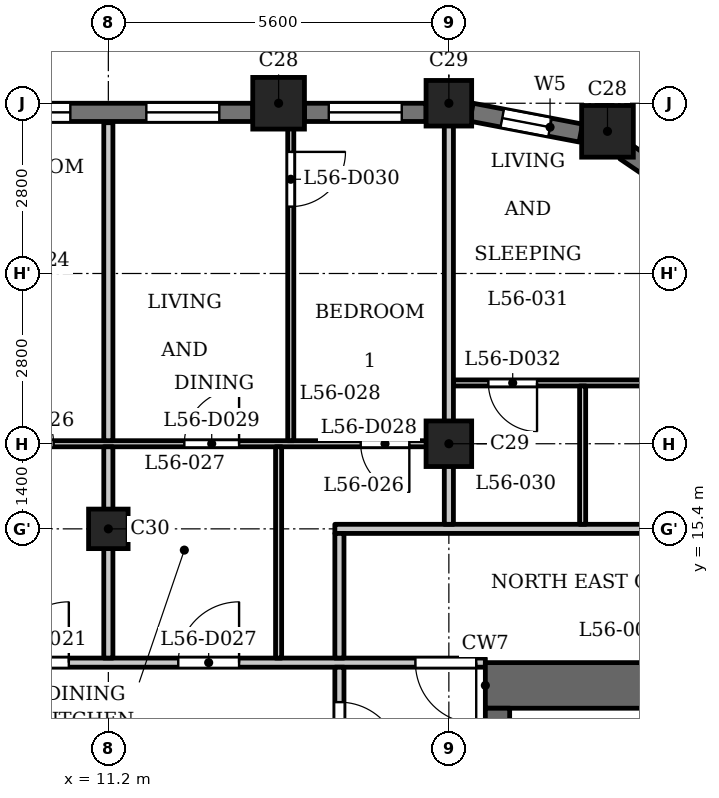
"""IFC4 building model, lengths in metres.
Left out: names, types, materials, properties, quantities, classifications, styles, units other than length and angle.
Written with IfcOpenShell. Run it as: python <this file> out.ifc"""

import sys

from ifc_helpers import new_model, si_unit, direction, frame, frame_2d, origin, origin_2d, place, context, subcontext, project, spatial, rectangle, extrude, element, fill, save


model = new_model("IFC4")
c1 = context("Model", 3, precision=1e-05, world=origin(), true_north=direction((0.0, 1.0)))
c2 = subcontext(c1, "Body", "Model", "MODEL_VIEW")
j1 = project(units=[si_unit("LENGTHUNIT", "METRE"), si_unit("PLANEANGLEUNIT", "RADIAN")], contexts=[c1])
p1 = place(None, origin())
s1 = spatial("IfcSite", under=j1, at=p1, CompositionType="ELEMENT")
p2 = place(p1, origin())
s2 = spatial("IfcBuilding", under=s1, at=p2, CompositionType="ELEMENT")
p3 = place(p2, frame((0.0, 0.0, 216.9)))
s3 = spatial("IfcBuildingStorey", under=s2, at=p3, CompositionType="ELEMENT", Elevation=216.9)
for number, where, z_axis, x_axis in (
    (1, (19.409, 21.938, 0.0), (0.0, 0.0, 1.0), (1.0, 0.0, 0.0)),
    (2, (14.0, 22.4, 0.0), (0.0, 0.0, 1.0), (1.0, 0.0, 0.0)),
):
    element("IfcColumn", number, at=place(p3, frame(where, z_axis=z_axis, x_axis=x_axis)), inside=s3, PredefinedType="COLUMN", context=c2, shape_type="SweptSolid", body=[
        extrude(rectangle(XDim=0.85, YDim=0.85, at=origin_2d()), origin(), (0.0, 0.0, 1.0), 3.5),
    ])
for number, where, z_axis, x_axis in (
    (3, (16.8, 16.8, 0.0), (0.0, 0.0, 1.0), (1.0, 0.0, 0.0)),
    (4, (16.8, 22.4, 0.0), (0.0, 0.0, 1.0), (1.0, 0.0, 0.0)),
):
    element("IfcColumn", number, at=place(p3, frame(where, z_axis=z_axis, x_axis=x_axis)), inside=s3, PredefinedType="COLUMN", context=c2, shape_type="SweptSolid", body=[
        extrude(rectangle(XDim=0.75, YDim=0.75, at=origin_2d()), origin(), (0.0, 0.0, 1.0), 3.5),
    ])
p4 = place(p3, frame((11.2, 15.4, 0.0), z_axis=(0.0, 0.0, 1.0), x_axis=(1.0, 0.0, 0.0)))
e5 = element("IfcColumn", 5, at=p4, inside=s3, PredefinedType="COLUMN", context=c2, shape_type="SweptSolid", body=[
    extrude(rectangle(XDim=0.65, YDim=0.65, at=origin_2d()), origin(), (0.0, 0.0, 1.0), 3.5),
])
p5 = place(p3, frame((20.796, 20.862, 0.0), z_axis=(0.0, 0.0, 1.0), x_axis=(-0.827035970432, 0.562149004813, 0.0)))
e6 = element("IfcWall", 6, at=p5, inside=s3, PredefinedType="SOLIDWALL", context=c2, shape_type="SweptSolid", body=[
    extrude(rectangle(XDim=1.327, YDim=0.3, at=frame_2d((0.664, 0.0))), origin(), (0.0, 0.0, 1.0), 2.5),
])
p6 = place(p3, frame((18.971, 21.91, 0.0), z_axis=(0.0, 0.0, 1.0), x_axis=(-0.982300037503, 0.187314271538, 0.0)))
e7 = element("IfcWall", 7, at=p6, inside=s3, PredefinedType="SOLIDWALL", context=c2, shape_type="SweptSolid", body=[
    extrude(rectangle(XDim=1.831, YDim=0.3, at=frame_2d((0.916, 0.0))), origin(), (0.0, 0.0, 1.0), 2.5),
])
p7 = place(p6, frame((0.516, 0.0, 0.6)))
e8 = element("IfcOpeningElement", 8, at=p7, cuts=e7, PredefinedType="OPENING", context=c2, shape_type="SweptSolid", body=[
    extrude(rectangle(XDim=0.8, YDim=1.55, at=frame_2d((0.4, 0.775))), frame((0.0, 0.16, 0.0), z_axis=(0.0, -1.0, 0.0), x_axis=(1.0, 0.0, 0.0)), (0.0, 0.0, 1.0), 0.32),
])
p8 = place(p3, frame((16.425, 22.25, 0.0), z_axis=(0.0, 0.0, 1.0), x_axis=(-1.0, 0.0, 0.0)))
e9 = element("IfcWall", 9, at=p8, inside=s3, PredefinedType="SOLIDWALL", context=c2, shape_type="SweptSolid", body=[
    extrude(rectangle(XDim=2.0, YDim=0.3, at=frame_2d((1.0, 0.0))), origin(), (0.0, 0.0, 1.0), 2.5),
])
p9 = place(p8, frame((0.4, 0.0, 0.6)))
e10 = element("IfcOpeningElement", 10, at=p9, cuts=e9, PredefinedType="OPENING", context=c2, shape_type="SweptSolid", body=[
    extrude(rectangle(XDim=1.2, YDim=1.55, at=frame_2d((0.6, 0.775))), frame((0.0, 0.16, 0.0), z_axis=(0.0, -1.0, 0.0), x_axis=(1.0, 0.0, 0.0)), (0.0, 0.0, 1.0), 0.32),
])
p10 = place(p3, frame((13.575, 22.25, 0.0), z_axis=(0.0, 0.0, 1.0), x_axis=(-1.0, 0.0, 0.0)))
e11 = element("IfcWall", 11, at=p10, inside=s3, PredefinedType="SOLIDWALL", context=c2, shape_type="SweptSolid", body=[
    extrude(rectangle(XDim=4.75, YDim=0.3, at=frame_2d((2.375, 0.0))), origin(), (0.0, 0.0, 1.0), 2.5),
])
p11 = place(p10, frame((0.55, 0.0, 0.6)))
e12 = element("IfcOpeningElement", 12, at=p11, cuts=e11, PredefinedType="OPENING", context=c2, shape_type="SweptSolid", body=[
    extrude(rectangle(XDim=1.2, YDim=1.55, at=frame_2d((0.6, 0.775))), frame((0.0, 0.16, 0.0), z_axis=(0.0, -1.0, 0.0), x_axis=(1.0, 0.0, 0.0)), (0.0, 0.0, 1.0), 0.32),
])
p12 = place(p10, frame((3.0, 0.0, 0.6)))
e13 = element("IfcOpeningElement", 13, at=p12, cuts=e11, PredefinedType="OPENING", context=c2, shape_type="SweptSolid", body=[
    extrude(rectangle(XDim=1.2, YDim=1.55, at=frame_2d((0.6, 0.775))), frame((0.0, 0.16, 0.0), z_axis=(0.0, -1.0, 0.0), x_axis=(1.0, 0.0, 0.0)), (0.0, 0.0, 1.0), 0.32),
])
p13 = place(p3, frame((17.4, 12.825, 0.0), z_axis=(0.0, 0.0, 1.0), x_axis=(1.0, 0.0, 0.0)))
e14 = element("IfcWall", 14, at=p13, inside=s3, PredefinedType="SHEAR", context=c2, shape_type="SweptSolid", body=[
    extrude(rectangle(XDim=7.6, YDim=0.75, at=frame_2d((3.8, 0.0))), origin(), (0.0, 0.0, 1.0), 3.2),
])
p14 = place(p3, frame((17.6, -12.45, 0.0), z_axis=(0.0, 0.0, 1.0), x_axis=(0.0, 1.0, 0.0)))
e15 = element("IfcWall", 15, at=p14, inside=s3, PredefinedType="SHEAR", context=c2, shape_type="SweptSolid", body=[
    extrude(rectangle(XDim=24.9, YDim=0.4, at=frame_2d((12.45, 0.0))), origin(), (0.0, 0.0, 1.0), 3.2),
])
p15 = place(p14, frame((6.85, 0.0, 0.0)))
e16 = element("IfcOpeningElement", 16, at=p15, cuts=e15, PredefinedType="OPENING", context=c2, shape_type="SweptSolid", body=[
    extrude(rectangle(XDim=0.9, YDim=2.1, at=frame_2d((0.45, 1.05))), frame((0.0, 0.21, 0.0), z_axis=(0.0, -1.0, 0.0), x_axis=(1.0, 0.0, 0.0)), (0.0, 0.0, 1.0), 0.42),
])
p16 = place(p14, frame((10.45, 0.0, 0.0)))
e17 = element("IfcOpeningElement", 17, at=p16, cuts=e15, PredefinedType="OPENING", context=c2, shape_type="SweptSolid", body=[
    extrude(rectangle(XDim=0.9, YDim=2.1, at=frame_2d((0.45, 1.05))), frame((0.0, 0.21, 0.0), z_axis=(0.0, -1.0, 0.0), x_axis=(1.0, 0.0, 0.0)), (0.0, 0.0, 1.0), 0.42),
])
p17 = place(p14, frame((15.6, 0.0, 0.0)))
e18 = element("IfcOpeningElement", 18, at=p17, cuts=e15, PredefinedType="OPENING", context=c2, shape_type="SweptSolid", body=[
    extrude(rectangle(XDim=1.1, YDim=2.1, at=frame_2d((0.55, 1.05))), frame((0.0, 0.21, 0.0), z_axis=(0.0, -1.0, 0.0), x_axis=(1.0, 0.0, 0.0)), (0.0, 0.0, 1.0), 0.42),
])
p18 = place(p14, frame((18.0, 0.0, 0.0)))
e19 = element("IfcOpeningElement", 19, at=p18, cuts=e15, PredefinedType="OPENING", context=c2, shape_type="SweptSolid", body=[
    extrude(rectangle(XDim=1.1, YDim=2.1, at=frame_2d((0.55, 1.05))), frame((0.0, 0.21, 0.0), z_axis=(0.0, -1.0, 0.0), x_axis=(1.0, 0.0, 0.0)), (0.0, 0.0, 1.0), 0.42),
])
p19 = place(p14, frame((23.025, 0.0, 0.0)))
e20 = element("IfcOpeningElement", 20, at=p19, cuts=e15, PredefinedType="OPENING", context=c2, shape_type="SweptSolid", body=[
    extrude(rectangle(XDim=1.1, YDim=2.1, at=frame_2d((0.55, 1.05))), frame((0.0, 0.21, 0.0), z_axis=(0.0, -1.0, 0.0), x_axis=(1.0, 0.0, 0.0)), (0.0, 0.0, 1.0), 0.42),
])
p20 = place(p14, frame((0.775, 0.0, 0.0)))
e21 = element("IfcOpeningElement", 21, at=p20, cuts=e15, PredefinedType="OPENING", context=c2, shape_type="SweptSolid", body=[
    extrude(rectangle(XDim=1.1, YDim=2.1, at=frame_2d((0.55, 1.05))), frame((0.0, 0.21, 0.0), z_axis=(0.0, -1.0, 0.0), x_axis=(1.0, 0.0, 0.0)), (0.0, 0.0, 1.0), 0.42),
])
p21 = place(p14, frame((12.925, 0.0, 0.0)))
e22 = element("IfcOpeningElement", 22, at=p21, cuts=e15, PredefinedType="OPENING", context=c2, shape_type="SweptSolid", body=[
    extrude(rectangle(XDim=1.8, YDim=2.1, at=frame_2d((0.9, 1.05))), frame((0.0, 0.21, 0.0), z_axis=(0.0, -1.0, 0.0), x_axis=(1.0, 0.0, 0.0)), (0.0, 0.0, 1.0), 0.42),
])
p22 = place(p3, frame((-17.4, 13.2, 0.0), z_axis=(0.0, 0.0, 1.0), x_axis=(1.0, 0.0, 0.0)))
e23 = element("IfcWall", 23, at=p22, inside=s3, PredefinedType="PARTITIONING", context=c2, shape_type="SweptSolid", body=[
    extrude(rectangle(XDim=34.8, YDim=0.15, at=frame_2d((17.4, 0.0))), origin(), (0.0, 0.0, 1.0), 3.2),
])
p23 = place(p22, frame((0.25, 0.0, 0.0)))
e24 = element("IfcOpeningElement", 24, at=p23, cuts=e23, PredefinedType="OPENING", context=c2, shape_type="SweptSolid", body=[
    extrude(rectangle(XDim=1.0, YDim=2.1, at=frame_2d((0.5, 1.05))), frame((0.0, 0.085, 0.0), z_axis=(0.0, -1.0, 0.0), x_axis=(1.0, 0.0, 0.0)), (0.0, 0.0, 1.0), 0.17),
])
p24 = place(p22, frame((33.65, 0.0, 0.0)))
e25 = element("IfcOpeningElement", 25, at=p24, cuts=e23, PredefinedType="OPENING", context=c2, shape_type="SweptSolid", body=[
    extrude(rectangle(XDim=1.0, YDim=2.1, at=frame_2d((0.5, 1.05))), frame((0.0, 0.085, 0.0), z_axis=(0.0, -1.0, 0.0), x_axis=(1.0, 0.0, 0.0)), (0.0, 0.0, 1.0), 0.17),
])
p25 = place(p22, frame((15.75, 0.0, 0.0)))
e26 = element("IfcOpeningElement", 26, at=p25, cuts=e23, PredefinedType="OPENING", context=c2, shape_type="SweptSolid", body=[
    extrude(rectangle(XDim=1.0, YDim=2.1, at=frame_2d((0.5, 1.05))), frame((0.0, 0.085, 0.0), z_axis=(0.0, -1.0, 0.0), x_axis=(1.0, 0.0, 0.0)), (0.0, 0.0, 1.0), 0.17),
])
p26 = place(p22, frame((26.95, 0.0, 0.0)))
e27 = element("IfcOpeningElement", 27, at=p26, cuts=e23, PredefinedType="OPENING", context=c2, shape_type="SweptSolid", body=[
    extrude(rectangle(XDim=1.0, YDim=2.1, at=frame_2d((0.5, 1.05))), frame((0.0, 0.085, 0.0), z_axis=(0.0, -1.0, 0.0), x_axis=(1.0, 0.0, 0.0)), (0.0, 0.0, 1.0), 0.17),
])
p27 = place(p22, frame((29.75, 0.0, 0.0)))
e28 = element("IfcOpeningElement", 28, at=p27, cuts=e23, PredefinedType="OPENING", context=c2, shape_type="SweptSolid", body=[
    extrude(rectangle(XDim=1.0, YDim=2.1, at=frame_2d((0.5, 1.05))), frame((0.0, 0.085, 0.0), z_axis=(0.0, -1.0, 0.0), x_axis=(1.0, 0.0, 0.0)), (0.0, 0.0, 1.0), 0.17),
])
p28 = place(p3, frame((14.925, 15.4, 0.0), z_axis=(0.0, 0.0, 1.0), x_axis=(1.0, 0.0, 0.0)))
e29 = element("IfcWall", 29, at=p28, inside=s3, PredefinedType="PARTITIONING", context=c2, shape_type="SweptSolid", body=[
    extrude(rectangle(XDim=9.759, YDim=0.15, at=frame_2d((4.879, 0.0))), origin(), (0.0, 0.0, 1.0), 3.2),
])
p29 = place(p28, frame((7.616, 0.0, 0.0)))
e30 = element("IfcOpeningElement", 30, at=p29, cuts=e29, PredefinedType="OPENING", context=c2, shape_type="SweptSolid", body=[
    extrude(rectangle(XDim=1.0, YDim=2.1, at=frame_2d((0.5, 1.05))), frame((0.0, 0.085, 0.0), z_axis=(0.0, -1.0, 0.0), x_axis=(1.0, 0.0, 0.0)), (0.0, 0.0, 1.0), 0.17),
])
p30 = place(p3, frame((-16.725, 16.8, 0.0), z_axis=(0.0, 0.0, 1.0), x_axis=(1.0, 0.0, 0.0)))
e31 = element("IfcWall", 31, at=p30, inside=s3, PredefinedType="PARTITIONING", context=c2, shape_type="SweptSolid", body=[
    extrude(rectangle(XDim=33.45, YDim=0.1, at=frame_2d((16.725, 0.0))), origin(), (0.0, 0.0, 1.0), 3.2),
])
p31 = place(p30, frame((11.675, 0.0, 0.0)))
e32 = element("IfcOpeningElement", 32, at=p31, cuts=e31, PredefinedType="OPENING", context=c2, shape_type="SweptSolid", body=[
    extrude(rectangle(XDim=0.9, YDim=2.1, at=frame_2d((0.45, 1.05))), frame((0.0, 0.06, 0.0), z_axis=(0.0, -1.0, 0.0), x_axis=(1.0, 0.0, 0.0)), (0.0, 0.0, 1.0), 0.12),
])
p32 = place(p30, frame((9.575, 0.0, 0.0)))
e33 = element("IfcOpeningElement", 33, at=p32, cuts=e31, PredefinedType="OPENING", context=c2, shape_type="SweptSolid", body=[
    extrude(rectangle(XDim=0.9, YDim=2.1, at=frame_2d((0.45, 1.05))), frame((0.0, 0.06, 0.0), z_axis=(0.0, -1.0, 0.0), x_axis=(1.0, 0.0, 0.0)), (0.0, 0.0, 1.0), 0.12),
])
p33 = place(p30, frame((17.375, 0.0, 0.0)))
e34 = element("IfcOpeningElement", 34, at=p33, cuts=e31, PredefinedType="OPENING", context=c2, shape_type="SweptSolid", body=[
    extrude(rectangle(XDim=0.8, YDim=2.1, at=frame_2d((0.4, 1.05))), frame((0.0, 0.06, 0.0), z_axis=(0.0, -1.0, 0.0), x_axis=(1.0, 0.0, 0.0)), (0.0, 0.0, 1.0), 0.12),
])
p34 = place(p30, frame((19.525, 0.0, 0.0)))
e35 = element("IfcOpeningElement", 35, at=p34, cuts=e31, PredefinedType="OPENING", context=c2, shape_type="SweptSolid", body=[
    extrude(rectangle(XDim=0.9, YDim=2.1, at=frame_2d((0.45, 1.05))), frame((0.0, 0.06, 0.0), z_axis=(0.0, -1.0, 0.0), x_axis=(1.0, 0.0, 0.0)), (0.0, 0.0, 1.0), 0.12),
])
p35 = place(p30, frame((23.775, 0.0, 0.0)))
e36 = element("IfcOpeningElement", 36, at=p35, cuts=e31, PredefinedType="OPENING", context=c2, shape_type="SweptSolid", body=[
    extrude(rectangle(XDim=0.9, YDim=2.1, at=frame_2d((0.45, 1.05))), frame((0.0, 0.06, 0.0), z_axis=(0.0, -1.0, 0.0), x_axis=(1.0, 0.0, 0.0)), (0.0, 0.0, 1.0), 0.12),
])
p36 = place(p30, frame((26.125, 0.0, 0.0)))
e37 = element("IfcOpeningElement", 37, at=p36, cuts=e31, PredefinedType="OPENING", context=c2, shape_type="SweptSolid", body=[
    extrude(rectangle(XDim=0.9, YDim=2.1, at=frame_2d((0.45, 1.05))), frame((0.0, 0.06, 0.0), z_axis=(0.0, -1.0, 0.0), x_axis=(1.0, 0.0, 0.0)), (0.0, 0.0, 1.0), 0.12),
])
p37 = place(p30, frame((32.075, 0.0, 0.0)))
e38 = element("IfcOpeningElement", 38, at=p37, cuts=e31, PredefinedType="OPENING", context=c2, shape_type="SweptSolid", body=[
    extrude(rectangle(XDim=0.8, YDim=2.1, at=frame_2d((0.4, 1.05))), frame((0.0, 0.06, 0.0), z_axis=(0.0, -1.0, 0.0), x_axis=(1.0, 0.0, 0.0)), (0.0, 0.0, 1.0), 0.12),
])
p38 = place(p30, frame((29.175, 0.0, 0.0)))
e39 = element("IfcOpeningElement", 39, at=p38, cuts=e31, PredefinedType="OPENING", context=c2, shape_type="SweptSolid", body=[
    extrude(rectangle(XDim=0.9, YDim=2.1, at=frame_2d((0.45, 1.05))), frame((0.0, 0.06, 0.0), z_axis=(0.0, -1.0, 0.0), x_axis=(1.0, 0.0, 0.0)), (0.0, 0.0, 1.0), 0.12),
])
p39 = place(p3, frame((16.875, 17.8, 0.0), z_axis=(0.0, 0.0, 1.0), x_axis=(1.0, 0.0, 0.0)))
e40 = element("IfcWall", 40, at=p39, inside=s3, PredefinedType="PARTITIONING", context=c2, shape_type="SweptSolid", body=[
    extrude(rectangle(XDim=6.719, YDim=0.1, at=frame_2d((3.359, 0.0))), origin(), (0.0, 0.0, 1.0), 3.2),
])
p40 = place(p39, frame((0.575, 0.0, 0.0)))
e41 = element("IfcOpeningElement", 41, at=p40, cuts=e40, PredefinedType="OPENING", context=c2, shape_type="SweptSolid", body=[
    extrude(rectangle(XDim=0.8, YDim=2.1, at=frame_2d((0.4, 1.05))), frame((0.0, 0.06, 0.0), z_axis=(0.0, -1.0, 0.0), x_axis=(1.0, 0.0, 0.0)), (0.0, 0.0, 1.0), 0.12),
])
p41 = place(p39, frame((4.693, 0.0, 0.0)))
e42 = element("IfcOpeningElement", 42, at=p41, cuts=e40, PredefinedType="OPENING", context=c2, shape_type="SweptSolid", body=[
    extrude(rectangle(XDim=0.9, YDim=2.1, at=frame_2d((0.45, 1.05))), frame((0.0, 0.06, 0.0), z_axis=(0.0, -1.0, 0.0), x_axis=(1.0, 0.0, 0.0)), (0.0, 0.0, 1.0), 0.12),
])
p42 = place(p3, frame((11.2, 13.275, 0.0), z_axis=(0.0, 0.0, 1.0), x_axis=(0.0, 1.0, 0.0)))
e43 = element("IfcWall", 43, at=p42, inside=s3, PredefinedType="PARTITIONING", context=c2, shape_type="SweptSolid", body=[
    extrude(rectangle(XDim=3.475, YDim=0.15, at=frame_2d((1.738, 0.0))), origin(), (0.0, 0.0, 1.0), 3.2),
])
p43 = place(p3, frame((11.2, 16.85, 0.0), z_axis=(0.0, 0.0, 1.0), x_axis=(0.0, 1.0, 0.0)))
e44 = element("IfcWall", 44, at=p43, inside=s3, PredefinedType="PARTITIONING", context=c2, shape_type="SweptSolid", body=[
    extrude(rectangle(XDim=5.23, YDim=0.15, at=frame_2d((2.615, 0.0))), origin(), (0.0, 0.0, 1.0), 3.2),
])
p44 = place(p3, frame((14.0, 13.275, 0.0), z_axis=(0.0, 0.0, 1.0), x_axis=(0.0, 1.0, 0.0)))
e45 = element("IfcWall", 45, at=p44, inside=s3, PredefinedType="PARTITIONING", context=c2, shape_type="SweptSolid", body=[
    extrude(rectangle(XDim=3.475, YDim=0.1, at=frame_2d((1.738, 0.0))), origin(), (0.0, 0.0, 1.0), 3.2),
])
p45 = place(p3, frame((14.2, 16.85, 0.0), z_axis=(0.0, 0.0, 1.0), x_axis=(0.0, 1.0, 0.0)))
e46 = element("IfcWall", 46, at=p45, inside=s3, PredefinedType="PARTITIONING", context=c2, shape_type="SweptSolid", body=[
    extrude(rectangle(XDim=5.46, YDim=0.1, at=frame_2d((2.73, 0.0))), origin(), (0.0, 0.0, 1.0), 3.2),
])
p46 = place(p45, frame((3.85, 0.0, 0.0)))
e47 = element("IfcOpeningElement", 47, at=p46, cuts=e46, PredefinedType="OPENING", context=c2, shape_type="SweptSolid", body=[
    extrude(rectangle(XDim=0.9, YDim=2.1, at=frame_2d((0.45, 1.05))), frame((0.0, 0.06, 0.0), z_axis=(0.0, -1.0, 0.0), x_axis=(1.0, 0.0, 0.0)), (0.0, 0.0, 1.0), 0.12),
])
p47 = place(p3, frame((15.0, 6.769, 0.0), z_axis=(0.0, 0.0, 1.0), x_axis=(0.0, 1.0, 0.0)))
e48 = element("IfcWall", 48, at=p47, inside=s3, PredefinedType="PARTITIONING", context=c2, shape_type="SweptSolid", body=[
    extrude(rectangle(XDim=6.356, YDim=0.15, at=frame_2d((3.178, 0.0))), origin(), (0.0, 0.0, 1.0), 3.2),
])
p48 = place(p47, frame((4.781, 0.0, 0.0)))
e49 = element("IfcOpeningElement", 49, at=p48, cuts=e48, PredefinedType="OPENING", context=c2, shape_type="SweptSolid", body=[
    extrude(rectangle(XDim=1.0, YDim=2.1, at=frame_2d((0.5, 1.05))), frame((0.0, 0.085, 0.0), z_axis=(0.0, -1.0, 0.0), x_axis=(1.0, 0.0, 0.0)), (0.0, 0.0, 1.0), 0.17),
])
p49 = place(p3, frame((15.0, 13.275, 0.0), z_axis=(0.0, 0.0, 1.0), x_axis=(0.0, 1.0, 0.0)))
e50 = element("IfcWall", 50, at=p49, inside=s3, PredefinedType="PARTITIONING", context=c2, shape_type="SweptSolid", body=[
    extrude(rectangle(XDim=2.05, YDim=0.15, at=frame_2d((1.025, 0.0))), origin(), (0.0, 0.0, 1.0), 3.2),
])
p50 = place(p3, frame((16.8, 15.475, 0.0), z_axis=(0.0, 0.0, 1.0), x_axis=(0.0, 1.0, 0.0)))
e51 = element("IfcWall", 51, at=p50, inside=s3, PredefinedType="PARTITIONING", context=c2, shape_type="SweptSolid", body=[
    extrude(rectangle(XDim=6.835, YDim=0.15, at=frame_2d((3.417, 0.0))), origin(), (0.0, 0.0, 1.0), 2.55),
])
p51 = place(p3, frame((19.0, 15.475, 0.0), z_axis=(0.0, 0.0, 1.0), x_axis=(0.0, 1.0, 0.0)))
e52 = element("IfcWall", 52, at=p51, inside=s3, PredefinedType="PARTITIONING", context=c2, shape_type="SweptSolid", body=[
    extrude(rectangle(XDim=2.275, YDim=0.1, at=frame_2d((1.137, 0.0))), origin(), (0.0, 0.0, 1.0), 3.2),
])
p52 = place(p48, origin())
e53 = element("IfcDoor", 53, at=p52, inside=s3, OperationType="SINGLE_SWING_LEFT", PredefinedType="DOOR", context=c2, shape_type="SweptSolid", body=[
    extrude(rectangle(XDim=1.0, YDim=2.1, at=frame_2d((0.5, 1.05))), frame((0.0, 0.025, 0.0), z_axis=(0.0, -1.0, 0.0), x_axis=(1.0, 0.0, 0.0)), (0.0, 0.0, 1.0), 0.05),
])
fill(e49, e53)
p53 = place(p24, origin())
e54 = element("IfcDoor", 54, at=p53, inside=s3, OperationType="SINGLE_SWING_RIGHT", PredefinedType="DOOR", context=c2, shape_type="SweptSolid", body=[
    extrude(rectangle(XDim=1.0, YDim=2.1, at=frame_2d((0.5, 1.05))), frame((0.0, 0.025, 0.0), z_axis=(0.0, -1.0, 0.0), x_axis=(1.0, 0.0, 0.0)), (0.0, 0.0, 1.0), 0.05),
])
fill(e25, e54)
p54 = place(p26, origin())
e55 = element("IfcDoor", 55, at=p54, inside=s3, OperationType="SINGLE_SWING_LEFT", PredefinedType="DOOR", context=c2, shape_type="SweptSolid", body=[
    extrude(rectangle(XDim=1.0, YDim=2.1, at=frame_2d((0.5, 1.05))), frame((0.0, 0.025, 0.0), z_axis=(0.0, -1.0, 0.0), x_axis=(1.0, 0.0, 0.0)), (0.0, 0.0, 1.0), 0.05),
])
fill(e27, e55)
p55 = place(p36, origin())
e56 = element("IfcDoor", 56, at=p55, inside=s3, OperationType="SINGLE_SWING_RIGHT", PredefinedType="DOOR", context=c2, shape_type="SweptSolid", body=[
    extrude(rectangle(XDim=0.9, YDim=2.1, at=frame_2d((0.45, 1.05))), frame((0.0, 0.025, 0.0), z_axis=(0.0, -1.0, 0.0), x_axis=(1.0, 0.0, 0.0)), (0.0, 0.0, 1.0), 0.05),
])
fill(e37, e56)
p56 = place(p27, origin())
e57 = element("IfcDoor", 57, at=p56, inside=s3, OperationType="SINGLE_SWING_LEFT", PredefinedType="DOOR", context=c2, shape_type="SweptSolid", body=[
    extrude(rectangle(XDim=1.0, YDim=2.1, at=frame_2d((0.5, 1.05))), frame((0.0, 0.025, 0.0), z_axis=(0.0, -1.0, 0.0), x_axis=(1.0, 0.0, 0.0)), (0.0, 0.0, 1.0), 0.05),
])
fill(e28, e57)
p57 = place(p37, origin())
e58 = element("IfcDoor", 58, at=p57, inside=s3, OperationType="SINGLE_SWING_RIGHT", PredefinedType="DOOR", context=c2, shape_type="SweptSolid", body=[
    extrude(rectangle(XDim=0.8, YDim=2.1, at=frame_2d((0.4, 1.05))), frame((0.0, 0.025, 0.0), z_axis=(0.0, -1.0, 0.0), x_axis=(1.0, 0.0, 0.0)), (0.0, 0.0, 1.0), 0.05),
])
fill(e38, e58)
p58 = place(p38, origin())
e59 = element("IfcDoor", 59, at=p58, inside=s3, OperationType="SINGLE_SWING_LEFT", PredefinedType="DOOR", context=c2, shape_type="SweptSolid", body=[
    extrude(rectangle(XDim=0.9, YDim=2.1, at=frame_2d((0.45, 1.05))), frame((0.0, 0.025, 0.0), z_axis=(0.0, -1.0, 0.0), x_axis=(1.0, 0.0, 0.0)), (0.0, 0.0, 1.0), 0.05),
])
fill(e39, e59)
p59 = place(p46, origin())
e60 = element("IfcDoor", 60, at=p59, inside=s3, OperationType="SINGLE_SWING_RIGHT", PredefinedType="DOOR", context=c2, shape_type="SweptSolid", body=[
    extrude(rectangle(XDim=0.9, YDim=2.1, at=frame_2d((0.45, 1.05))), frame((0.0, 0.025, 0.0), z_axis=(0.0, -1.0, 0.0), x_axis=(1.0, 0.0, 0.0)), (0.0, 0.0, 1.0), 0.05),
])
fill(e47, e60)
p60 = place(p40, origin())
e61 = element("IfcDoor", 61, at=p60, inside=s3, OperationType="SINGLE_SWING_RIGHT", PredefinedType="DOOR", context=c2, shape_type="SweptSolid", body=[
    extrude(rectangle(XDim=0.8, YDim=2.1, at=frame_2d((0.4, 1.05))), frame((0.0, 0.025, 0.0), z_axis=(0.0, -1.0, 0.0), x_axis=(1.0, 0.0, 0.0)), (0.0, 0.0, 1.0), 0.05),
])
fill(e41, e61)
p61 = place(p7, origin())
e62 = element("IfcWindow", 62, at=p61, inside=s3, PartitioningType="SINGLE_PANEL", PredefinedType="WINDOW", context=c2, shape_type="SweptSolid", body=[
    extrude(rectangle(XDim=0.8, YDim=1.55, at=frame_2d((0.4, 0.775))), frame((0.0, 0.03, 0.0), z_axis=(0.0, -1.0, 0.0), x_axis=(1.0, 0.0, 0.0)), (0.0, 0.0, 1.0), 0.06),
])
fill(e8, e62)
p62 = place(p9, origin())
e63 = element("IfcWindow", 63, at=p62, inside=s3, PartitioningType="SINGLE_PANEL", PredefinedType="WINDOW", context=c2, shape_type="SweptSolid", body=[
    extrude(rectangle(XDim=1.2, YDim=1.55, at=frame_2d((0.6, 0.775))), frame((0.0, 0.03, 0.0), z_axis=(0.0, -1.0, 0.0), x_axis=(1.0, 0.0, 0.0)), (0.0, 0.0, 1.0), 0.06),
])
fill(e10, e63)
p63 = place(p11, origin())
e64 = element("IfcWindow", 64, at=p63, inside=s3, PartitioningType="SINGLE_PANEL", PredefinedType="WINDOW", context=c2, shape_type="SweptSolid", body=[
    extrude(rectangle(XDim=1.2, YDim=1.55, at=frame_2d((0.6, 0.775))), frame((0.0, 0.03, 0.0), z_axis=(0.0, -1.0, 0.0), x_axis=(1.0, 0.0, 0.0)), (0.0, 0.0, 1.0), 0.06),
])
fill(e12, e64)
p64 = place(p12, origin())
e65 = element("IfcWindow", 65, at=p64, inside=s3, PartitioningType="SINGLE_PANEL", PredefinedType="WINDOW", context=c2, shape_type="SweptSolid", body=[
    extrude(rectangle(XDim=1.2, YDim=1.55, at=frame_2d((0.6, 0.775))), frame((0.0, 0.03, 0.0), z_axis=(0.0, -1.0, 0.0), x_axis=(1.0, 0.0, 0.0)), (0.0, 0.0, 1.0), 0.06),
])
fill(e13, e65)
save(model, sys.argv[1])
